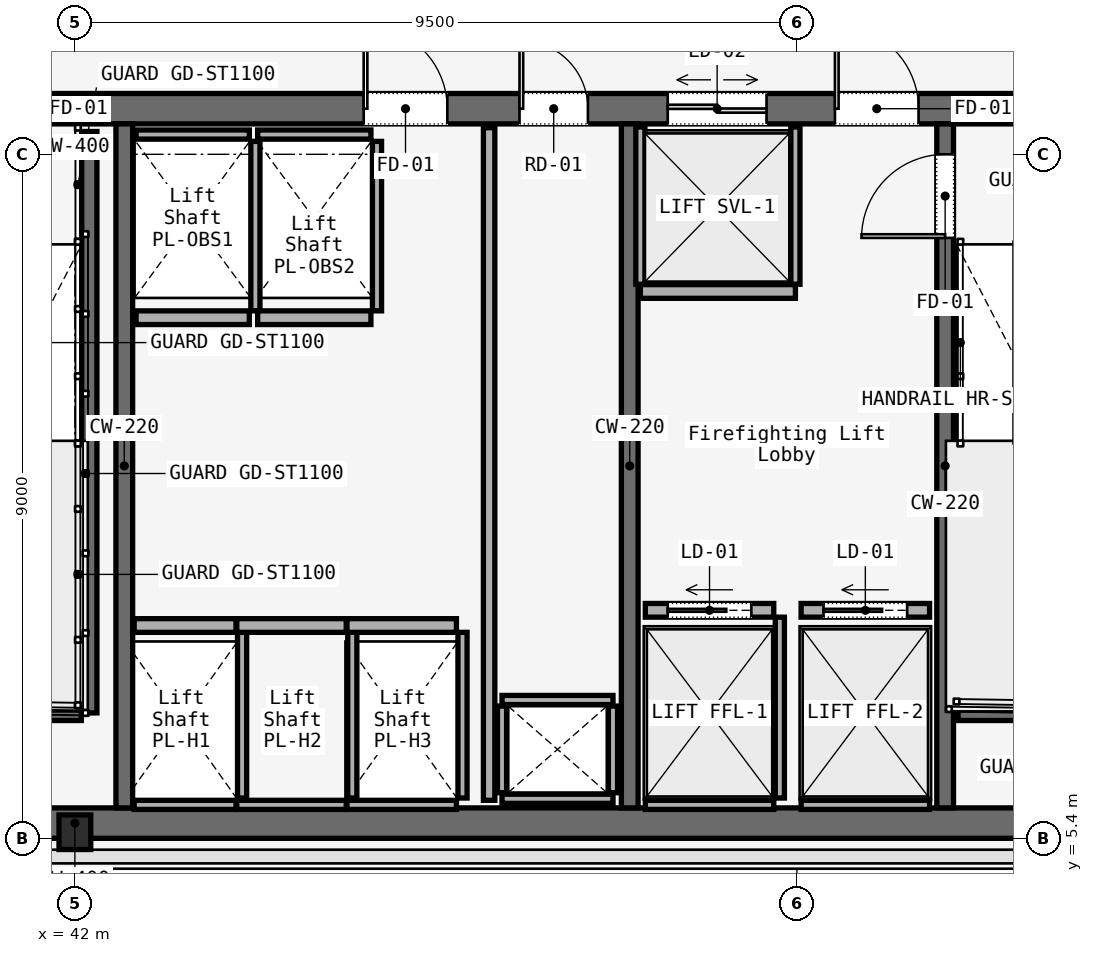
"""IFC4 building model, lengths in metres.
Left out: names, types, materials, properties, quantities, classifications, styles, units other than length and angle.
Written with IfcOpenShell. Run it as: python <this file> out.ifc"""

import sys

from ifc_helpers import new_model, si_unit, direction, frame, frame_2d, origin, origin_2d, place, context, subcontext, project, spatial, rectangle, i_section, extrude, element, fill, save


model = new_model("IFC4")
c1 = context("Model", 3, precision=1e-05, world=origin(), true_north=direction((0.0, 1.0)))
c2 = subcontext(c1, "Body", "Model", "MODEL_VIEW")
j1 = project(units=[si_unit("LENGTHUNIT", "METRE"), si_unit("PLANEANGLEUNIT", "RADIAN")], contexts=[c1])
p1 = place(None, origin())
s1 = spatial("IfcSite", under=j1, at=p1, CompositionType="ELEMENT")
p2 = place(p1, origin())
s2 = spatial("IfcBuilding", under=s1, at=p2, CompositionType="ELEMENT")
p3 = place(p2, frame((0.0, 0.0, 172.6)))
s3 = spatial("IfcBuildingStorey", under=s2, at=p3, CompositionType="ELEMENT", Elevation=172.6)
p4 = place(p3, frame((26.45, 15.0, 0.0), z_axis=(0.0, 0.0, 1.0), x_axis=(1.0, 0.0, 0.0)))
e1 = element("IfcWall", 1, at=p4, inside=s3, PredefinedType="SOLIDWALL", context=c2, shape_type="SweptSolid", body=[
    extrude(rectangle(XDim=31.1, YDim=0.4, at=frame_2d((15.55, 0.0))), origin(), (0.0, 0.0, 1.0), 3.58),
])
p5 = place(p4, frame((1.65, 0.0, 0.0)))
e2 = element("IfcOpeningElement", 2, at=p5, cuts=e1, PredefinedType="OPENING", context=c2, shape_type="SweptSolid", body=[
    extrude(rectangle(XDim=1.1, YDim=2.2, at=frame_2d((0.55, 1.1))), frame((0.0, 0.2, 0.0), z_axis=(0.0, -1.0, 0.0), x_axis=(1.0, 0.0, 0.0)), (0.0, 0.0, 1.0), 0.4),
])
p6 = place(p4, frame((13.65, 0.0, 0.0)))
e3 = element("IfcOpeningElement", 3, at=p6, cuts=e1, PredefinedType="OPENING", context=c2, shape_type="SweptSolid", body=[
    extrude(rectangle(XDim=1.1, YDim=2.2, at=frame_2d((0.55, 1.1))), frame((0.0, 0.2, 0.0), z_axis=(0.0, -1.0, 0.0), x_axis=(1.0, 0.0, 0.0)), (0.0, 0.0, 1.0), 0.4),
])
p7 = place(p4, frame((25.55, 0.0, 0.0)))
e4 = element("IfcOpeningElement", 4, at=p7, cuts=e1, PredefinedType="OPENING", context=c2, shape_type="SweptSolid", body=[
    extrude(rectangle(XDim=1.1, YDim=2.2, at=frame_2d((0.55, 1.1))), frame((0.0, 0.2, 0.0), z_axis=(0.0, -1.0, 0.0), x_axis=(1.0, 0.0, 0.0)), (0.0, 0.0, 1.0), 0.4),
])
p8 = place(p4, frame((10.7, 0.0, 0.0)))
e5 = element("IfcOpeningElement", 5, at=p8, cuts=e1, PredefinedType="OPENING", context=c2, shape_type="SweptSolid", body=[
    extrude(rectangle(XDim=1.4, YDim=2.2, at=frame_2d((0.7, 1.1))), frame((0.0, 0.2, 0.0), z_axis=(0.0, -1.0, 0.0), x_axis=(1.0, 0.0, 0.0)), (0.0, 0.0, 1.0), 0.4),
])
p9 = place(p4, frame((19.35, 0.0, 0.0)))
e6 = element("IfcOpeningElement", 6, at=p9, cuts=e1, PredefinedType="OPENING", context=c2, shape_type="SweptSolid", body=[
    extrude(rectangle(XDim=1.1, YDim=2.2, at=frame_2d((0.55, 1.1))), frame((0.0, 0.2, 0.0), z_axis=(0.0, -1.0, 0.0), x_axis=(1.0, 0.0, 0.0)), (0.0, 0.0, 1.0), 0.4),
])
p10 = place(p4, frame((21.4, 0.0, 0.0)))
e7 = element("IfcOpeningElement", 7, at=p10, cuts=e1, PredefinedType="OPENING", context=c2, shape_type="SweptSolid", body=[
    extrude(rectangle(XDim=0.9, YDim=2.1, at=frame_2d((0.45, 1.05))), frame((0.0, 0.2, 0.0), z_axis=(0.0, -1.0, 0.0), x_axis=(1.0, 0.0, 0.0)), (0.0, 0.0, 1.0), 0.4),
])
p11 = place(p4, frame((23.35, 0.0, 0.0)))
e8 = element("IfcOpeningElement", 8, at=p11, cuts=e1, PredefinedType="OPENING", context=c2, shape_type="SweptSolid", body=[
    extrude(rectangle(XDim=1.3, YDim=2.3, at=frame_2d((0.65, 1.15))), frame((0.0, 0.2, 0.0), z_axis=(0.0, -1.0, 0.0), x_axis=(1.0, 0.0, 0.0)), (0.0, 0.0, 1.0), 0.4),
])
p12 = place(p3, frame((26.45, 5.6, 0.0), z_axis=(0.0, 0.0, 1.0), x_axis=(1.0, 0.0, 0.0)))
e9 = element("IfcWall", 9, at=p12, inside=s3, PredefinedType="SOLIDWALL", context=c2, shape_type="SweptSolid", body=[
    extrude(rectangle(XDim=31.1, YDim=0.4, at=frame_2d((15.55, 0.0))), origin(), (0.0, 0.0, 1.0), 3.58),
])
for number, where, z_axis, x_axis in (
    (10, (42.65, 5.8, 0.0), (0.0, 0.0, 1.0), (0.0, 1.0, 0.0)),
    (11, (49.3, 5.8, 0.0), (0.0, 0.0, 1.0), (0.0, 1.0, 0.0)),
):
    element("IfcWall", number, at=place(p3, frame(where, z_axis=z_axis, x_axis=x_axis)), inside=s3, PredefinedType="SOLIDWALL", context=c2, shape_type="SweptSolid", body=[
        extrude(rectangle(XDim=9.0, YDim=0.22, at=frame_2d((4.5, 0.0))), origin(), (0.0, 0.0, 1.0), 3.58),
    ])
p13 = place(p3, frame((53.45, 5.8, 0.0), z_axis=(0.0, 0.0, 1.0), x_axis=(0.0, 1.0, 0.0)))
e12 = element("IfcWall", 12, at=p13, inside=s3, PredefinedType="SOLIDWALL", context=c2, shape_type="SweptSolid", body=[
    extrude(rectangle(XDim=9.0, YDim=0.22, at=frame_2d((4.5, 0.0))), origin(), (0.0, 0.0, 1.0), 3.58),
])
p14 = place(p13, frame((7.5, 0.0, 0.0)))
e13 = element("IfcOpeningElement", 13, at=p14, cuts=e12, PredefinedType="OPENING", context=c2, shape_type="SweptSolid", body=[
    extrude(rectangle(XDim=1.1, YDim=2.2, at=frame_2d((0.55, 1.1))), frame((0.0, 0.11, 0.0), z_axis=(0.0, -1.0, 0.0), x_axis=(1.0, 0.0, 0.0)), (0.0, 0.0, 1.0), 0.22),
])
p15 = place(p3, frame((42.0, 5.48, 0.0), z_axis=(0.0, 0.0, 1.0), x_axis=(1.0, 0.0, 0.0)))
e14 = element("IfcColumn", 14, at=p15, inside=s3, PredefinedType="COLUMN", context=c2, shape_type="SweptSolid", body=[
    extrude(i_section(OverallWidth=0.418, OverallDepth=0.455, WebThickness=0.042, FlangeThickness=0.052, FilletRadius=0.015, at=origin_2d()), origin(), (0.0, 0.0, 1.0), 3.58),
])
p16 = place(p3, frame((42.19, 14.7, 0.0), z_axis=(0.0, 0.0, 1.0), x_axis=(0.0, -1.0, 0.0)))
e15 = element("IfcWall", 15, at=p16, inside=s3, PredefinedType="SOLIDWALL", context=c2, shape_type="SweptSolid", body=[
    extrude(rectangle(XDim=7.65, YDim=0.2, at=frame_2d((3.825, 0.0))), origin(), (0.0, 0.0, 1.0), 3.8),
])
for number, where, z_axis, x_axis in (
    (16, (38.97, 7.05, 0.0), (0.0, 0.0, 1.0), (1.0, 0.0, 0.0)),
    (17, (53.62, 7.05, 0.0), (0.0, 0.0, 1.0), (1.0, 0.0, 0.0)),
):
    element("IfcWall", number, at=place(p3, frame(where, z_axis=z_axis, x_axis=x_axis)), inside=s3, PredefinedType="SOLIDWALL", context=c2, shape_type="SweptSolid", body=[
        extrude(rectangle(XDim=3.115, YDim=0.2, at=frame_2d((1.558, 0.0))), origin(), (0.0, 0.0, 1.0), 3.8),
    ])
for number, where, z_axis, x_axis in (
    (18, (47.62, 5.92, 0.0), (0.0, 0.0, 1.0), (1.0, 0.0, 0.0)),
    (19, (47.62, 7.22, 0.0), (0.0, 0.0, 1.0), (1.0, 0.0, 0.0)),
):
    element("IfcWall", number, at=place(p3, frame(where, z_axis=z_axis, x_axis=x_axis)), inside=s3, PredefinedType="SOLIDWALL", context=c2, shape_type="SweptSolid", body=[
        extrude(rectangle(XDim=1.46, YDim=0.12, at=frame_2d((0.73, 0.0))), origin(), (0.0, 0.0, 1.0), 3.01),
    ])
for number, where, z_axis, x_axis in (
    (20, (47.62, 6.0, 0.0), (0.0, 0.0, 1.0), (0.0, 1.0, 0.0)),
    (21, (49.08, 6.0, 0.0), (0.0, 0.0, 1.0), (0.0, 1.0, 0.0)),
):
    element("IfcWall", number, at=place(p3, frame(where, z_axis=z_axis, x_axis=x_axis)), inside=s3, PredefinedType="SOLIDWALL", context=c2, shape_type="SweptSolid", body=[
        extrude(rectangle(XDim=1.14, YDim=0.12, at=frame_2d((0.57, 0.0))), origin(), (0.0, 0.0, 1.0), 3.01),
    ])
p17 = place(p3, frame((47.45, 5.9, 0.0), z_axis=(0.0, 0.0, 1.0), x_axis=(0.0, 1.0, 0.0)))
e22 = element("IfcWall", 22, at=p17, inside=s3, PredefinedType="PARTITIONING", context=c2, shape_type="SweptSolid", body=[
    extrude(rectangle(XDim=8.85, YDim=0.15, at=frame_2d((4.425, 0.0))), origin(), (0.0, 0.0, 1.0), 3.01),
])
p18 = place(p3, frame((42.78, 8.2, 0.0), z_axis=(0.0, 0.0, 1.0), x_axis=(1.0, 0.0, 0.0)))
e23 = element("IfcWall", 23, at=p18, inside=s3, PredefinedType="SOLIDWALL", context=c2, shape_type="SweptSolid", body=[
    extrude(rectangle(XDim=1.34, YDim=0.18, at=frame_2d((0.67, 0.0))), origin(), (0.0, 0.0, 1.0), 3.01),
])
p19 = place(p3, frame((42.78, 5.84, 0.0), z_axis=(0.0, 0.0, 1.0), x_axis=(1.0, 0.0, 0.0)))
e24 = element("IfcWall", 24, at=p19, inside=s3, PredefinedType="SOLIDWALL", context=c2, shape_type="SweptSolid", body=[
    extrude(rectangle(XDim=1.34, YDim=0.12, at=frame_2d((0.67, 0.0))), origin(), (0.0, 0.0, 1.0), 3.01),
])
p20 = place(p3, frame((44.2, 5.93, 0.0), z_axis=(0.0, 0.0, 1.0), x_axis=(0.0, 1.0, 0.0)))
e25 = element("IfcWall", 25, at=p20, inside=s3, PredefinedType="SOLIDWALL", context=c2, shape_type="SweptSolid", body=[
    extrude(rectangle(XDim=2.18, YDim=0.12, at=frame_2d((1.09, 0.0))), origin(), (0.0, 0.0, 1.0), 3.01),
])
p21 = place(p3, frame((44.13, 8.2, 0.0), z_axis=(0.0, 0.0, 1.0), x_axis=(1.0, 0.0, 0.0)))
e26 = element("IfcWall", 26, at=p21, inside=s3, PredefinedType="SOLIDWALL", context=c2, shape_type="SweptSolid", body=[
    extrude(rectangle(XDim=1.44, YDim=0.18, at=frame_2d((0.72, 0.0))), origin(), (0.0, 0.0, 1.0), 3.01),
])
p22 = place(p3, frame((44.13, 5.84, 0.0), z_axis=(0.0, 0.0, 1.0), x_axis=(1.0, 0.0, 0.0)))
e27 = element("IfcWall", 27, at=p22, inside=s3, PredefinedType="SOLIDWALL", context=c2, shape_type="SweptSolid", body=[
    extrude(rectangle(XDim=1.44, YDim=0.12, at=frame_2d((0.72, 0.0))), origin(), (0.0, 0.0, 1.0), 3.01),
])
p23 = place(p3, frame((45.65, 5.93, 0.0), z_axis=(0.0, 0.0, 1.0), x_axis=(0.0, 1.0, 0.0)))
e28 = element("IfcWall", 28, at=p23, inside=s3, PredefinedType="SOLIDWALL", context=c2, shape_type="SweptSolid", body=[
    extrude(rectangle(XDim=2.18, YDim=0.12, at=frame_2d((1.09, 0.0))), origin(), (0.0, 0.0, 1.0), 3.01),
])
p24 = place(p3, frame((45.58, 8.2, 0.0), z_axis=(0.0, 0.0, 1.0), x_axis=(1.0, 0.0, 0.0)))
e29 = element("IfcWall", 29, at=p24, inside=s3, PredefinedType="SOLIDWALL", context=c2, shape_type="SweptSolid", body=[
    extrude(rectangle(XDim=1.44, YDim=0.18, at=frame_2d((0.72, 0.0))), origin(), (0.0, 0.0, 1.0), 3.01),
])
p25 = place(p3, frame((45.58, 5.84, 0.0), z_axis=(0.0, 0.0, 1.0), x_axis=(1.0, 0.0, 0.0)))
e30 = element("IfcWall", 30, at=p25, inside=s3, PredefinedType="SOLIDWALL", context=c2, shape_type="SweptSolid", body=[
    extrude(rectangle(XDim=1.44, YDim=0.12, at=frame_2d((0.72, 0.0))), origin(), (0.0, 0.0, 1.0), 3.01),
])
p26 = place(p3, frame((47.1, 5.93, 0.0), z_axis=(0.0, 0.0, 1.0), x_axis=(0.0, 1.0, 0.0)))
e31 = element("IfcWall", 31, at=p26, inside=s3, PredefinedType="SOLIDWALL", context=c2, shape_type="SweptSolid", body=[
    extrude(rectangle(XDim=2.18, YDim=0.12, at=frame_2d((1.09, 0.0))), origin(), (0.0, 0.0, 1.0), 3.01),
])
p27 = place(p3, frame((42.805, 12.25, 0.0), z_axis=(0.0, 0.0, 1.0), x_axis=(1.0, 0.0, 0.0)))
e32 = element("IfcWall", 32, at=p27, inside=s3, PredefinedType="SOLIDWALL", context=c2, shape_type="SweptSolid", body=[
    extrude(rectangle(XDim=1.49, YDim=0.18, at=frame_2d((0.745, 0.0))), origin(), (0.0, 0.0, 1.0), 3.01),
])
p28 = place(p3, frame((42.805, 14.66, 0.0), z_axis=(0.0, 0.0, 1.0), x_axis=(1.0, 0.0, 0.0)))
e33 = element("IfcWall", 33, at=p28, inside=s3, PredefinedType="SOLIDWALL", context=c2, shape_type="SweptSolid", body=[
    extrude(rectangle(XDim=1.49, YDim=0.12, at=frame_2d((0.745, 0.0))), origin(), (0.0, 0.0, 1.0), 3.01),
])
p29 = place(p3, frame((44.375, 12.34, 0.0), z_axis=(0.0, 0.0, 1.0), x_axis=(0.0, 1.0, 0.0)))
e34 = element("IfcWall", 34, at=p29, inside=s3, PredefinedType="SOLIDWALL", context=c2, shape_type="SweptSolid", body=[
    extrude(rectangle(XDim=2.23, YDim=0.12, at=frame_2d((1.115, 0.0))), origin(), (0.0, 0.0, 1.0), 3.01),
])
p30 = place(p3, frame((44.405, 12.25, 0.0), z_axis=(0.0, 0.0, 1.0), x_axis=(1.0, 0.0, 0.0)))
e35 = element("IfcWall", 35, at=p30, inside=s3, PredefinedType="SOLIDWALL", context=c2, shape_type="SweptSolid", body=[
    extrude(rectangle(XDim=1.49, YDim=0.18, at=frame_2d((0.745, 0.0))), origin(), (0.0, 0.0, 1.0), 3.01),
])
p31 = place(p3, frame((44.405, 14.66, 0.0), z_axis=(0.0, 0.0, 1.0), x_axis=(1.0, 0.0, 0.0)))
e36 = element("IfcWall", 36, at=p31, inside=s3, PredefinedType="SOLIDWALL", context=c2, shape_type="SweptSolid", body=[
    extrude(rectangle(XDim=1.49, YDim=0.12, at=frame_2d((0.745, 0.0))), origin(), (0.0, 0.0, 1.0), 3.01),
])
p32 = place(p3, frame((45.975, 12.34, 0.0), z_axis=(0.0, 0.0, 1.0), x_axis=(0.0, 1.0, 0.0)))
e37 = element("IfcWall", 37, at=p32, inside=s3, PredefinedType="SOLIDWALL", context=c2, shape_type="SweptSolid", body=[
    extrude(rectangle(XDim=2.23, YDim=0.12, at=frame_2d((1.115, 0.0))), origin(), (0.0, 0.0, 1.0), 3.01),
])
p33 = place(p3, frame((49.505, 8.4, 0.0), z_axis=(0.0, 0.0, 1.0), x_axis=(1.0, 0.0, 0.0)))
e38 = element("IfcWall", 38, at=p33, inside=s3, PredefinedType="SOLIDWALL", context=c2, shape_type="SweptSolid", body=[
    extrude(rectangle(XDim=1.69, YDim=0.18, at=frame_2d((0.845, 0.0))), origin(), (0.0, 0.0, 1.0), 3.01),
])
p34 = place(p33, frame((0.295, 0.0, 0.0)))
e39 = element("IfcOpeningElement", 39, at=p34, cuts=e38, PredefinedType="OPENING", context=c2, shape_type="SweptSolid", body=[
    extrude(rectangle(XDim=1.1, YDim=2.2, at=frame_2d((0.55, 1.1))), frame((0.0, 0.09, 0.0), z_axis=(0.0, -1.0, 0.0), x_axis=(1.0, 0.0, 0.0)), (0.0, 0.0, 1.0), 0.18),
])
p35 = place(p3, frame((49.505, 5.84, 0.0), z_axis=(0.0, 0.0, 1.0), x_axis=(1.0, 0.0, 0.0)))
e40 = element("IfcWall", 40, at=p35, inside=s3, PredefinedType="SOLIDWALL", context=c2, shape_type="SweptSolid", body=[
    extrude(rectangle(XDim=1.69, YDim=0.12, at=frame_2d((0.845, 0.0))), origin(), (0.0, 0.0, 1.0), 3.01),
])
p36 = place(p3, frame((51.275, 5.93, 0.0), z_axis=(0.0, 0.0, 1.0), x_axis=(0.0, 1.0, 0.0)))
e41 = element("IfcWall", 41, at=p36, inside=s3, PredefinedType="SOLIDWALL", context=c2, shape_type="SweptSolid", body=[
    extrude(rectangle(XDim=2.38, YDim=0.12, at=frame_2d((1.19, 0.0))), origin(), (0.0, 0.0, 1.0), 3.01),
])
p37 = place(p3, frame((51.555, 8.4, 0.0), z_axis=(0.0, 0.0, 1.0), x_axis=(1.0, 0.0, 0.0)))
e42 = element("IfcWall", 42, at=p37, inside=s3, PredefinedType="SOLIDWALL", context=c2, shape_type="SweptSolid", body=[
    extrude(rectangle(XDim=1.69, YDim=0.18, at=frame_2d((0.845, 0.0))), origin(), (0.0, 0.0, 1.0), 3.01),
])
p38 = place(p37, frame((0.295, 0.0, 0.0)))
e43 = element("IfcOpeningElement", 43, at=p38, cuts=e42, PredefinedType="OPENING", context=c2, shape_type="SweptSolid", body=[
    extrude(rectangle(XDim=1.1, YDim=2.2, at=frame_2d((0.55, 1.1))), frame((0.0, 0.09, 0.0), z_axis=(0.0, -1.0, 0.0), x_axis=(1.0, 0.0, 0.0)), (0.0, 0.0, 1.0), 0.18),
])
p39 = place(p3, frame((51.555, 5.84, 0.0), z_axis=(0.0, 0.0, 1.0), x_axis=(1.0, 0.0, 0.0)))
e44 = element("IfcWall", 44, at=p39, inside=s3, PredefinedType="SOLIDWALL", context=c2, shape_type="SweptSolid", body=[
    extrude(rectangle(XDim=1.69, YDim=0.12, at=frame_2d((0.845, 0.0))), origin(), (0.0, 0.0, 1.0), 3.01),
])
p40 = place(p3, frame((49.44, 12.595, 0.0), z_axis=(0.0, 0.0, 1.0), x_axis=(1.0, 0.0, 0.0)))
e45 = element("IfcWall", 45, at=p40, inside=s3, PredefinedType="SOLIDWALL", context=c2, shape_type="SweptSolid", body=[
    extrude(rectangle(XDim=2.04, YDim=0.18, at=frame_2d((1.02, 0.0))), origin(), (0.0, 0.0, 1.0), 3.01),
])
for number, where, z_axis, x_axis in (
    (46, (49.44, 12.69, 0.0), (0.0, 0.0, 1.0), (0.0, 1.0, 0.0)),
    (47, (51.48, 12.69, 0.0), (0.0, 0.0, 1.0), (0.0, 1.0, 0.0)),
):
    element("IfcWall", number, at=place(p3, frame(where, z_axis=z_axis, x_axis=x_axis)), inside=s3, PredefinedType="SOLIDWALL", context=c2, shape_type="SweptSolid", body=[
        extrude(rectangle(XDim=2.07, YDim=0.12, at=frame_2d((1.035, 0.0))), origin(), (0.0, 0.0, 1.0), 3.01),
    ])
p41 = place(p7, origin())
e48 = element("IfcDoor", 48, at=p41, inside=s3, OperationType="SINGLE_SWING_RIGHT", PredefinedType="DOOR", context=c2, shape_type="SweptSolid", body=[
    extrude(rectangle(XDim=1.1, YDim=2.2, at=frame_2d((0.55, 1.1))), frame((0.0, 0.025, 0.0), z_axis=(0.0, -1.0, 0.0), x_axis=(1.0, 0.0, 0.0)), (0.0, 0.0, 1.0), 0.05),
])
fill(e4, e48)
p42 = place(p9, origin())
e49 = element("IfcDoor", 49, at=p42, inside=s3, OperationType="SINGLE_SWING_LEFT", PredefinedType="DOOR", context=c2, shape_type="SweptSolid", body=[
    extrude(rectangle(XDim=1.1, YDim=2.2, at=frame_2d((0.55, 1.1))), frame((0.0, 0.025, 0.0), z_axis=(0.0, -1.0, 0.0), x_axis=(1.0, 0.0, 0.0)), (0.0, 0.0, 1.0), 0.05),
])
fill(e6, e49)
p43 = place(p10, origin())
e50 = element("IfcDoor", 50, at=p43, inside=s3, OperationType="SINGLE_SWING_LEFT", PredefinedType="DOOR", context=c2, shape_type="SweptSolid", body=[
    extrude(rectangle(XDim=0.9, YDim=2.1, at=frame_2d((0.45, 1.05))), frame((0.0, 0.025, 0.0), z_axis=(0.0, -1.0, 0.0), x_axis=(1.0, 0.0, 0.0)), (0.0, 0.0, 1.0), 0.05),
])
fill(e7, e50)
p44 = place(p14, origin())
e51 = element("IfcDoor", 51, at=p44, inside=s3, OperationType="SINGLE_SWING_LEFT", PredefinedType="DOOR", context=c2, shape_type="SweptSolid", body=[
    extrude(rectangle(XDim=1.1, YDim=2.2, at=frame_2d((0.55, 1.1))), frame((0.0, 0.025, 0.0), z_axis=(0.0, -1.0, 0.0), x_axis=(1.0, 0.0, 0.0)), (0.0, 0.0, 1.0), 0.05),
])
fill(e13, e51)
p45 = place(p34, origin())
e52 = element("IfcDoor", 52, at=p45, inside=s3, OperationType="SLIDING_TO_LEFT", PredefinedType="DOOR", context=c2, shape_type="SweptSolid", body=[
    extrude(rectangle(XDim=1.1, YDim=2.2, at=frame_2d((0.55, 1.1))), frame((0.0, 0.025, 0.0), z_axis=(0.0, -1.0, 0.0), x_axis=(1.0, 0.0, 0.0)), (0.0, 0.0, 1.0), 0.05),
])
fill(e39, e52)
p46 = place(p38, origin())
e53 = element("IfcDoor", 53, at=p46, inside=s3, OperationType="SLIDING_TO_LEFT", PredefinedType="DOOR", context=c2, shape_type="SweptSolid", body=[
    extrude(rectangle(XDim=1.1, YDim=2.2, at=frame_2d((0.55, 1.1))), frame((0.0, 0.025, 0.0), z_axis=(0.0, -1.0, 0.0), x_axis=(1.0, 0.0, 0.0)), (0.0, 0.0, 1.0), 0.05),
])
fill(e43, e53)
p47 = place(p11, origin())
e54 = element("IfcDoor", 54, at=p47, inside=s3, OperationType="DOUBLE_DOOR_SLIDING", PredefinedType="DOOR", context=c2, shape_type="SweptSolid", body=[
    extrude(rectangle(XDim=1.3, YDim=2.3, at=frame_2d((0.65, 1.15))), frame((0.0, 0.025, 0.0), z_axis=(0.0, -1.0, 0.0), x_axis=(1.0, 0.0, 0.0)), (0.0, 0.0, 1.0), 0.05),
])
fill(e8, e54)
save(model, sys.argv[1])
